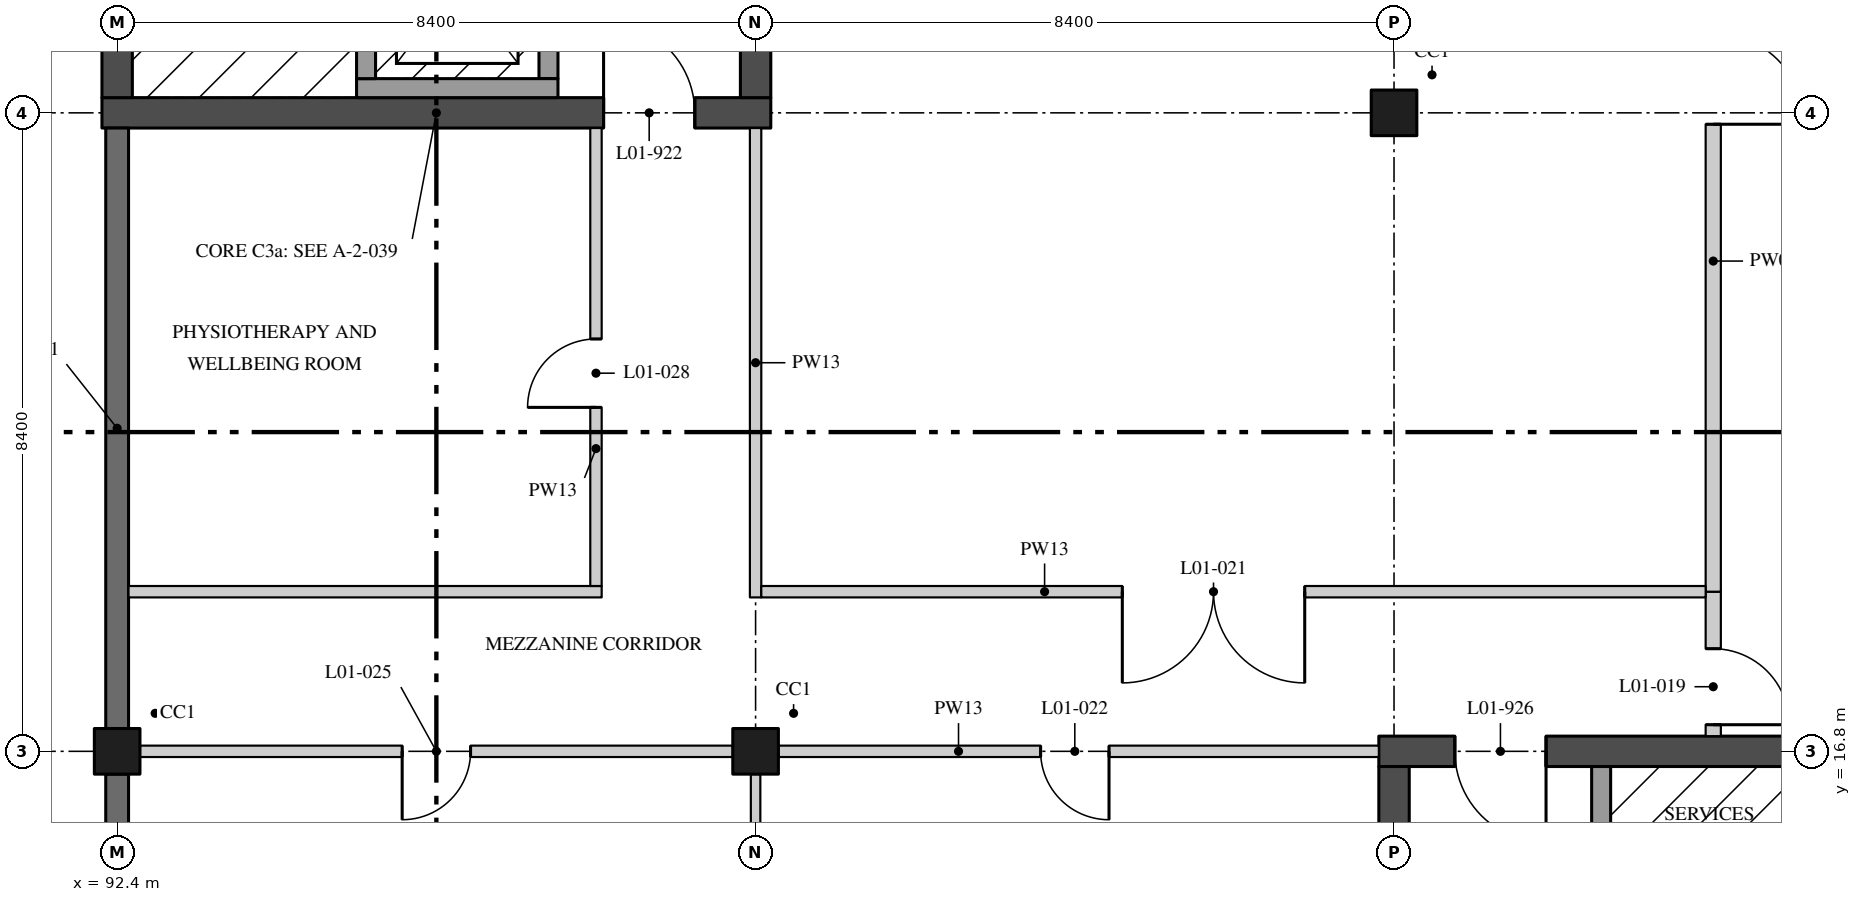
"""IFC4 building model, lengths in metres.
Left out: names, types, materials, properties, quantities, classifications, styles, units other than length and angle.
Written with IfcOpenShell. Run it as: python <this file> out.ifc"""

import sys

from ifc_helpers import new_model, si_unit, direction, frame, frame_2d, origin, origin_2d, place, context, subcontext, project, spatial, rectangle, extrude, element, fill, save


model = new_model("IFC4")
c1 = context("Model", 3, precision=1e-05, world=origin(), true_north=direction((0.0, 1.0)))
c2 = subcontext(c1, "Body", "Model", "MODEL_VIEW")
j1 = project(units=[si_unit("LENGTHUNIT", "METRE"), si_unit("PLANEANGLEUNIT", "RADIAN")], contexts=[c1])
p1 = place(None, origin())
s1 = spatial("IfcSite", under=j1, at=p1, CompositionType="ELEMENT")
p2 = place(p1, origin())
s2 = spatial("IfcBuilding", under=s1, at=p2, CompositionType="ELEMENT")
p3 = place(p2, frame((0.0, 0.0, 5.4)))
s3 = spatial("IfcBuildingStorey", under=s2, at=p3, CompositionType="ELEMENT", Elevation=5.4)
for number, where, z_axis, x_axis in (
    (1, (92.4, 16.8, 0.0), (0.0, 0.0, 1.0), (1.0, 0.0, 0.0)),
    (2, (100.8, 16.8, 0.0), (0.0, 0.0, 1.0), (1.0, 0.0, 0.0)),
    (3, (109.2, 25.2, 0.0), (0.0, 0.0, 1.0), (1.0, 0.0, 0.0)),
):
    element("IfcColumn", number, at=place(p3, frame(where, z_axis=z_axis, x_axis=x_axis)), inside=s3, PredefinedType="COLUMN", context=c2, shape_type="SweptSolid", body=[
        extrude(rectangle(XDim=0.6, YDim=0.6, at=origin_2d()), origin(), (0.0, 0.0, 1.0), 3.0),
    ])
p4 = place(p3, frame((92.2, 25.2, 0.0), z_axis=(0.0, 0.0, 1.0), x_axis=(1.0, 0.0, 0.0)))
e4 = element("IfcWall", 4, at=p4, inside=s3, PredefinedType="SHEAR", context=c2, shape_type="SweptSolid", body=[
    extrude(rectangle(XDim=8.8, YDim=0.4, at=frame_2d((4.4, 0.0))), origin(), (0.0, 0.0, 1.0), 3.0),
])
p5 = place(p4, frame((6.6, 0.0, 0.0)))
e5 = element("IfcOpeningElement", 5, at=p5, cuts=e4, PredefinedType="OPENING", context=c2, shape_type="SweptSolid", body=[
    extrude(rectangle(XDim=1.2, YDim=2.1, at=frame_2d((0.6, 1.05))), frame((0.0, 0.21, 0.0), z_axis=(0.0, -1.0, 0.0), x_axis=(1.0, 0.0, 0.0)), (0.0, 0.0, 1.0), 0.42),
])
for number, where, z_axis, x_axis in (
    (6, (92.4, 25.4, 0.0), (0.0, 0.0, 1.0), (0.0, 1.0, 0.0)),
    (7, (100.8, 25.4, 0.0), (0.0, 0.0, 1.0), (0.0, 1.0, 0.0)),
):
    element("IfcWall", number, at=place(p3, frame(where, z_axis=z_axis, x_axis=x_axis)), inside=s3, PredefinedType="SHEAR", context=c2, shape_type="SweptSolid", body=[
        extrude(rectangle(XDim=8.0, YDim=0.4, at=frame_2d((4.0, 0.0))), origin(), (0.0, 0.0, 1.0), 3.0),
    ])
p6 = place(p3, frame((109.0, 16.8, 0.0), z_axis=(0.0, 0.0, 1.0), x_axis=(1.0, 0.0, 0.0)))
e8 = element("IfcWall", 8, at=p6, inside=s3, PredefinedType="SHEAR", context=c2, shape_type="SweptSolid", body=[
    extrude(rectangle(XDim=8.8, YDim=0.4, at=frame_2d((4.4, 0.0))), origin(), (0.0, 0.0, 1.0), 3.0),
])
p7 = place(p6, frame((1.0, 0.0, 0.0)))
e9 = element("IfcOpeningElement", 9, at=p7, cuts=e8, PredefinedType="OPENING", context=c2, shape_type="SweptSolid", body=[
    extrude(rectangle(XDim=1.2, YDim=2.1, at=frame_2d((0.6, 1.05))), frame((0.0, 0.21, 0.0), z_axis=(0.0, -1.0, 0.0), x_axis=(1.0, 0.0, 0.0)), (0.0, 0.0, 1.0), 0.42),
])
p8 = place(p3, frame((109.2, 8.6, 0.0), z_axis=(0.0, 0.0, 1.0), x_axis=(0.0, 1.0, 0.0)))
e10 = element("IfcWall", 10, at=p8, inside=s3, PredefinedType="SHEAR", context=c2, shape_type="SweptSolid", body=[
    extrude(rectangle(XDim=8.0, YDim=0.4, at=frame_2d((4.0, 0.0))), origin(), (0.0, 0.0, 1.0), 3.0),
])
p9 = place(p3, frame((111.925, 13.8, 0.0), z_axis=(0.0, 0.0, 1.0), x_axis=(0.0, 1.0, 0.0)))
e11 = element("IfcWall", 11, at=p9, inside=s3, PredefinedType="SOLIDWALL", context=c2, shape_type="SweptSolid", body=[
    extrude(rectangle(XDim=2.8, YDim=0.25, at=frame_2d((1.4, 0.0))), origin(), (0.0, 0.0, 1.0), 3.0),
])
p10 = place(p3, frame((98.075, 25.65, 0.0), z_axis=(0.0, 0.0, 1.0), x_axis=(0.0, 1.0, 0.0)))
e12 = element("IfcWall", 12, at=p10, inside=s3, PredefinedType="SOLIDWALL", context=c2, shape_type="SweptSolid", body=[
    extrude(rectangle(XDim=2.3, YDim=0.25, at=frame_2d((1.15, 0.0))), origin(), (0.0, 0.0, 1.0), 3.0),
])
p11 = place(p3, frame((95.55, 25.525, 0.0), z_axis=(0.0, 0.0, 1.0), x_axis=(1.0, 0.0, 0.0)))
e13 = element("IfcWall", 13, at=p11, inside=s3, PredefinedType="SOLIDWALL", context=c2, shape_type="SweptSolid", body=[
    extrude(rectangle(XDim=2.65, YDim=0.25, at=frame_2d((1.325, 0.0))), origin(), (0.0, 0.0, 1.0), 3.0),
])
p12 = place(p3, frame((95.675, 25.65, 0.0), z_axis=(0.0, 0.0, 1.0), x_axis=(0.0, 1.0, 0.0)))
e14 = element("IfcWall", 14, at=p12, inside=s3, PredefinedType="SOLIDWALL", context=c2, shape_type="SweptSolid", body=[
    extrude(rectangle(XDim=2.3, YDim=0.25, at=frame_2d((1.15, 0.0))), origin(), (0.0, 0.0, 1.0), 3.0),
])
p13 = place(p3, frame((113.4, 17.0, 0.0), z_axis=(0.0, 0.0, 1.0), x_axis=(0.0, 1.0, 0.0)))
e15 = element("IfcWall", 15, at=p13, inside=s3, PredefinedType="PARTITIONING", context=c2, shape_type="SweptSolid", body=[
    extrude(rectangle(XDim=1.9, YDim=0.2, at=frame_2d((0.95, 0.0))), origin(), (0.0, 0.0, 1.0), 4.37),
])
p14 = place(p13, frame((0.15, 0.0, 0.0)))
e16 = element("IfcOpeningElement", 16, at=p14, cuts=e15, PredefinedType="OPENING", context=c2, shape_type="SweptSolid", body=[
    extrude(rectangle(XDim=1.0, YDim=2.4, at=frame_2d((0.5, 1.2))), frame((0.0, 0.11, 0.0), z_axis=(0.0, -1.0, 0.0), x_axis=(1.0, 0.0, 0.0)), (0.0, 0.0, 1.0), 0.22),
])
p15 = place(p3, frame((113.4, 18.9, 0.0), z_axis=(0.0, 0.0, 1.0), x_axis=(0.0, 1.0, 0.0)))
e17 = element("IfcWall", 17, at=p15, inside=s3, PredefinedType="PARTITIONING", context=c2, shape_type="SweptSolid", body=[
    extrude(rectangle(XDim=14.5, YDim=0.2, at=frame_2d((7.25, 0.0))), origin(), (0.0, 0.0, 1.0), 4.37),
])
p16 = place(p15, frame((6.15, 0.0, 0.0)))
e18 = element("IfcOpeningElement", 18, at=p16, cuts=e17, PredefinedType="OPENING", context=c2, shape_type="SweptSolid", body=[
    extrude(rectangle(XDim=2.4, YDim=2.7, at=frame_2d((1.2, 1.35))), frame((0.0, 0.11, 0.0), z_axis=(0.0, -1.0, 0.0), x_axis=(1.0, 0.0, 0.0)), (0.0, 0.0, 1.0), 0.22),
])
p17 = place(p3, frame((100.8, 18.825, 0.0), z_axis=(0.0, 0.0, 1.0), x_axis=(0.0, 1.0, 0.0)))
e19 = element("IfcWall", 19, at=p17, inside=s3, PredefinedType="PARTITIONING", context=c2, shape_type="SweptSolid", body=[
    extrude(rectangle(XDim=6.175, YDim=0.15, at=frame_2d((3.087, 0.0))), origin(), (0.0, 0.0, 1.0), 2.975),
])
p18 = place(p3, frame((100.875, 18.9, 0.0), z_axis=(0.0, 0.0, 1.0), x_axis=(1.0, 0.0, 0.0)))
e20 = element("IfcWall", 20, at=p18, inside=s3, PredefinedType="PARTITIONING", context=c2, shape_type="SweptSolid", body=[
    extrude(rectangle(XDim=12.425, YDim=0.15, at=frame_2d((6.212, 0.0))), origin(), (0.0, 0.0, 1.0), 4.37),
])
p19 = place(p18, frame((4.75, 0.0, 0.0)))
e21 = element("IfcOpeningElement", 21, at=p19, cuts=e20, PredefinedType="OPENING", context=c2, shape_type="SweptSolid", body=[
    extrude(rectangle(XDim=2.4, YDim=2.7, at=frame_2d((1.2, 1.35))), frame((0.0, 0.085, 0.0), z_axis=(0.0, -1.0, 0.0), x_axis=(1.0, 0.0, 0.0)), (0.0, 0.0, 1.0), 0.17),
])
p20 = place(p3, frame((101.1, 16.8, 0.0), z_axis=(0.0, 0.0, 1.0), x_axis=(1.0, 0.0, 0.0)))
e22 = element("IfcWall", 22, at=p20, inside=s3, PredefinedType="PARTITIONING", context=c2, shape_type="SweptSolid", body=[
    extrude(rectangle(XDim=7.9, YDim=0.15, at=frame_2d((3.95, 0.0))), origin(), (0.0, 0.0, 1.0), 4.37),
])
p21 = place(p20, frame((3.45, 0.0, 0.0)))
e23 = element("IfcOpeningElement", 23, at=p21, cuts=e22, PredefinedType="OPENING", context=c2, shape_type="SweptSolid", body=[
    extrude(rectangle(XDim=0.9, YDim=2.1, at=frame_2d((0.45, 1.05))), frame((0.0, 0.085, 0.0), z_axis=(0.0, -1.0, 0.0), x_axis=(1.0, 0.0, 0.0)), (0.0, 0.0, 1.0), 0.17),
])
p22 = place(p3, frame((92.7, 16.8, 0.0), z_axis=(0.0, 0.0, 1.0), x_axis=(1.0, 0.0, 0.0)))
e24 = element("IfcWall", 24, at=p22, inside=s3, PredefinedType="PARTITIONING", context=c2, shape_type="SweptSolid", body=[
    extrude(rectangle(XDim=7.8, YDim=0.15, at=frame_2d((3.9, 0.0))), origin(), (0.0, 0.0, 1.0), 4.37),
])
p23 = place(p22, frame((3.45, 0.0, 0.0)))
e25 = element("IfcOpeningElement", 25, at=p23, cuts=e24, PredefinedType="OPENING", context=c2, shape_type="SweptSolid", body=[
    extrude(rectangle(XDim=0.9, YDim=2.1, at=frame_2d((0.45, 1.05))), frame((0.0, 0.085, 0.0), z_axis=(0.0, -1.0, 0.0), x_axis=(1.0, 0.0, 0.0)), (0.0, 0.0, 1.0), 0.17),
])
p24 = place(p3, frame((92.55, 18.9, 0.0), z_axis=(0.0, 0.0, 1.0), x_axis=(1.0, 0.0, 0.0)))
e26 = element("IfcWall", 26, at=p24, inside=s3, PredefinedType="PARTITIONING", context=c2, shape_type="SweptSolid", body=[
    extrude(rectangle(XDim=6.225, YDim=0.15, at=frame_2d((3.112, 0.0))), origin(), (0.0, 0.0, 1.0), 4.37),
])
p25 = place(p3, frame((98.7, 18.975, 0.0), z_axis=(0.0, 0.0, 1.0), x_axis=(0.0, 1.0, 0.0)))
e27 = element("IfcWall", 27, at=p25, inside=s3, PredefinedType="PARTITIONING", context=c2, shape_type="SweptSolid", body=[
    extrude(rectangle(XDim=6.025, YDim=0.15, at=frame_2d((3.012, 0.0))), origin(), (0.0, 0.0, 1.0), 4.37),
])
p26 = place(p25, frame((2.35, 0.0, 0.0)))
e28 = element("IfcOpeningElement", 28, at=p26, cuts=e27, PredefinedType="OPENING", context=c2, shape_type="SweptSolid", body=[
    extrude(rectangle(XDim=0.9, YDim=2.1, at=frame_2d((0.45, 1.05))), frame((0.0, 0.085, 0.0), z_axis=(0.0, -1.0, 0.0), x_axis=(1.0, 0.0, 0.0)), (0.0, 0.0, 1.0), 0.17),
])
p27 = place(p3, frame((100.8, 12.662, 0.0), z_axis=(0.0, 0.0, 1.0), x_axis=(0.0, 1.0, 0.0)))
e29 = element("IfcWall", 29, at=p27, inside=s3, PredefinedType="PARTITIONING", context=c2, shape_type="SweptSolid", body=[
    extrude(rectangle(XDim=3.838, YDim=0.125, at=frame_2d((1.919, 0.0))), origin(), (0.0, 0.0, 1.0), 2.975),
])
p28 = place(p3, frame((92.4, 17.1, 3.0), z_axis=(0.0, 0.0, 1.0), x_axis=(0.0, -1.0, 0.0)))
e30 = element("IfcWall", 30, at=p28, inside=s3, PredefinedType="SOLIDWALL", context=c2, shape_type="SweptSolid", body=[
    extrude(rectangle(XDim=0.6, YDim=0.3, at=frame_2d((0.3, 0.0))), origin(), (0.0, 0.0, 1.0), 1.5),
])
p29 = place(p3, frame((92.4, 25.0, 0.0), z_axis=(0.0, 0.0, 1.0), x_axis=(0.0, -1.0, 0.0)))
e31 = element("IfcWall", 31, at=p29, inside=s3, PredefinedType="SOLIDWALL", context=c2, shape_type="SweptSolid", body=[
    extrude(rectangle(XDim=7.9, YDim=0.3, at=frame_2d((3.95, 0.0))), origin(), (0.0, 0.0, 1.0), 2.975),
])
p30 = place(p3, frame((92.4, 16.5, 0.0), z_axis=(0.0, 0.0, 1.0), x_axis=(0.0, -1.0, 0.0)))
e32 = element("IfcWall", 32, at=p30, inside=s3, PredefinedType="SOLIDWALL", context=c2, shape_type="SweptSolid", body=[
    extrude(rectangle(XDim=7.8, YDim=0.3, at=frame_2d((3.9, 0.0))), origin(), (0.0, 0.0, 1.0), 2.975),
])
p31 = place(p5, origin())
e33 = element("IfcDoor", 33, at=p31, inside=s3, OperationType="SINGLE_SWING_RIGHT", PredefinedType="DOOR", context=c2, shape_type="SweptSolid", body=[
    extrude(rectangle(XDim=1.2, YDim=2.1, at=frame_2d((0.6, 1.05))), frame((0.0, 0.035, 0.0), z_axis=(0.0, -1.0, 0.0), x_axis=(1.0, 0.0, 0.0)), (0.0, 0.0, 1.0), 0.07),
])
fill(e5, e33)
p32 = place(p7, frame((1.2, 0.0, 0.0), z_axis=(0.0, 0.0, 1.0), x_axis=(-1.0, 0.0, 0.0)))
e34 = element("IfcDoor", 34, at=p32, inside=s3, OperationType="SINGLE_SWING_RIGHT", PredefinedType="DOOR", context=c2, shape_type="SweptSolid", body=[
    extrude(rectangle(XDim=1.2, YDim=2.1, at=frame_2d((0.6, 1.05))), frame((0.0, 0.035, 0.0), z_axis=(0.0, -1.0, 0.0), x_axis=(1.0, 0.0, 0.0)), (0.0, 0.0, 1.0), 0.07),
])
fill(e9, e34)
p33 = place(p14, frame((1.0, 0.0, 0.0), z_axis=(0.0, 0.0, 1.0), x_axis=(-1.0, 0.0, 0.0)))
e35 = element("IfcDoor", 35, at=p33, inside=s3, OperationType="SINGLE_SWING_LEFT", PredefinedType="DOOR", context=c2, shape_type="SweptSolid", body=[
    extrude(rectangle(XDim=1.0, YDim=2.4, at=frame_2d((0.5, 1.2))), frame((0.0, 0.03, 0.0), z_axis=(0.0, -1.0, 0.0), x_axis=(1.0, 0.0, 0.0)), (0.0, 0.0, 1.0), 0.06),
])
fill(e16, e35)
p34 = place(p16, frame((2.4, 0.0, 0.0), z_axis=(0.0, 0.0, 1.0), x_axis=(-1.0, 0.0, 0.0)))
e36 = element("IfcDoor", 36, at=p34, inside=s3, OperationType="DOUBLE_DOOR_SINGLE_SWING", PredefinedType="DOOR", context=c2, shape_type="SweptSolid", body=[
    extrude(rectangle(XDim=2.4, YDim=2.7, at=frame_2d((1.2, 1.35))), frame((0.0, 0.03, 0.0), z_axis=(0.0, -1.0, 0.0), x_axis=(1.0, 0.0, 0.0)), (0.0, 0.0, 1.0), 0.06),
])
fill(e18, e36)
p35 = place(p19, frame((2.4, 0.0, 0.0), z_axis=(0.0, 0.0, 1.0), x_axis=(-1.0, 0.0, 0.0)))
e37 = element("IfcDoor", 37, at=p35, inside=s3, OperationType="DOUBLE_DOOR_SINGLE_SWING", PredefinedType="DOOR", context=c2, shape_type="SweptSolid", body=[
    extrude(rectangle(XDim=2.4, YDim=2.7, at=frame_2d((1.2, 1.35))), frame((0.0, 0.025, 0.0), z_axis=(0.0, -1.0, 0.0), x_axis=(1.0, 0.0, 0.0)), (0.0, 0.0, 1.0), 0.05),
])
fill(e21, e37)
p36 = place(p21, frame((0.9, 0.0, 0.0), z_axis=(0.0, 0.0, 1.0), x_axis=(-1.0, 0.0, 0.0)))
e38 = element("IfcDoor", 38, at=p36, inside=s3, OperationType="SINGLE_SWING_RIGHT", PredefinedType="DOOR", context=c2, shape_type="SweptSolid", body=[
    extrude(rectangle(XDim=0.9, YDim=2.1, at=frame_2d((0.45, 1.05))), frame((0.0, 0.025, 0.0), z_axis=(0.0, -1.0, 0.0), x_axis=(1.0, 0.0, 0.0)), (0.0, 0.0, 1.0), 0.05),
])
fill(e23, e38)
p37 = place(p23, frame((0.9, 0.0, 0.0), z_axis=(0.0, 0.0, 1.0), x_axis=(-1.0, 0.0, 0.0)))
e39 = element("IfcDoor", 39, at=p37, inside=s3, OperationType="SINGLE_SWING_LEFT", PredefinedType="DOOR", context=c2, shape_type="SweptSolid", body=[
    extrude(rectangle(XDim=0.9, YDim=2.1, at=frame_2d((0.45, 1.05))), frame((0.0, 0.025, 0.0), z_axis=(0.0, -1.0, 0.0), x_axis=(1.0, 0.0, 0.0)), (0.0, 0.0, 1.0), 0.05),
])
fill(e25, e39)
p38 = place(p26, origin())
e40 = element("IfcDoor", 40, at=p38, inside=s3, OperationType="SINGLE_SWING_RIGHT", PredefinedType="DOOR", context=c2, shape_type="SweptSolid", body=[
    extrude(rectangle(XDim=0.9, YDim=2.1, at=frame_2d((0.45, 1.05))), frame((0.0, 0.025, 0.0), z_axis=(0.0, -1.0, 0.0), x_axis=(1.0, 0.0, 0.0)), (0.0, 0.0, 1.0), 0.05),
])
fill(e28, e40)
save(model, sys.argv[1])
